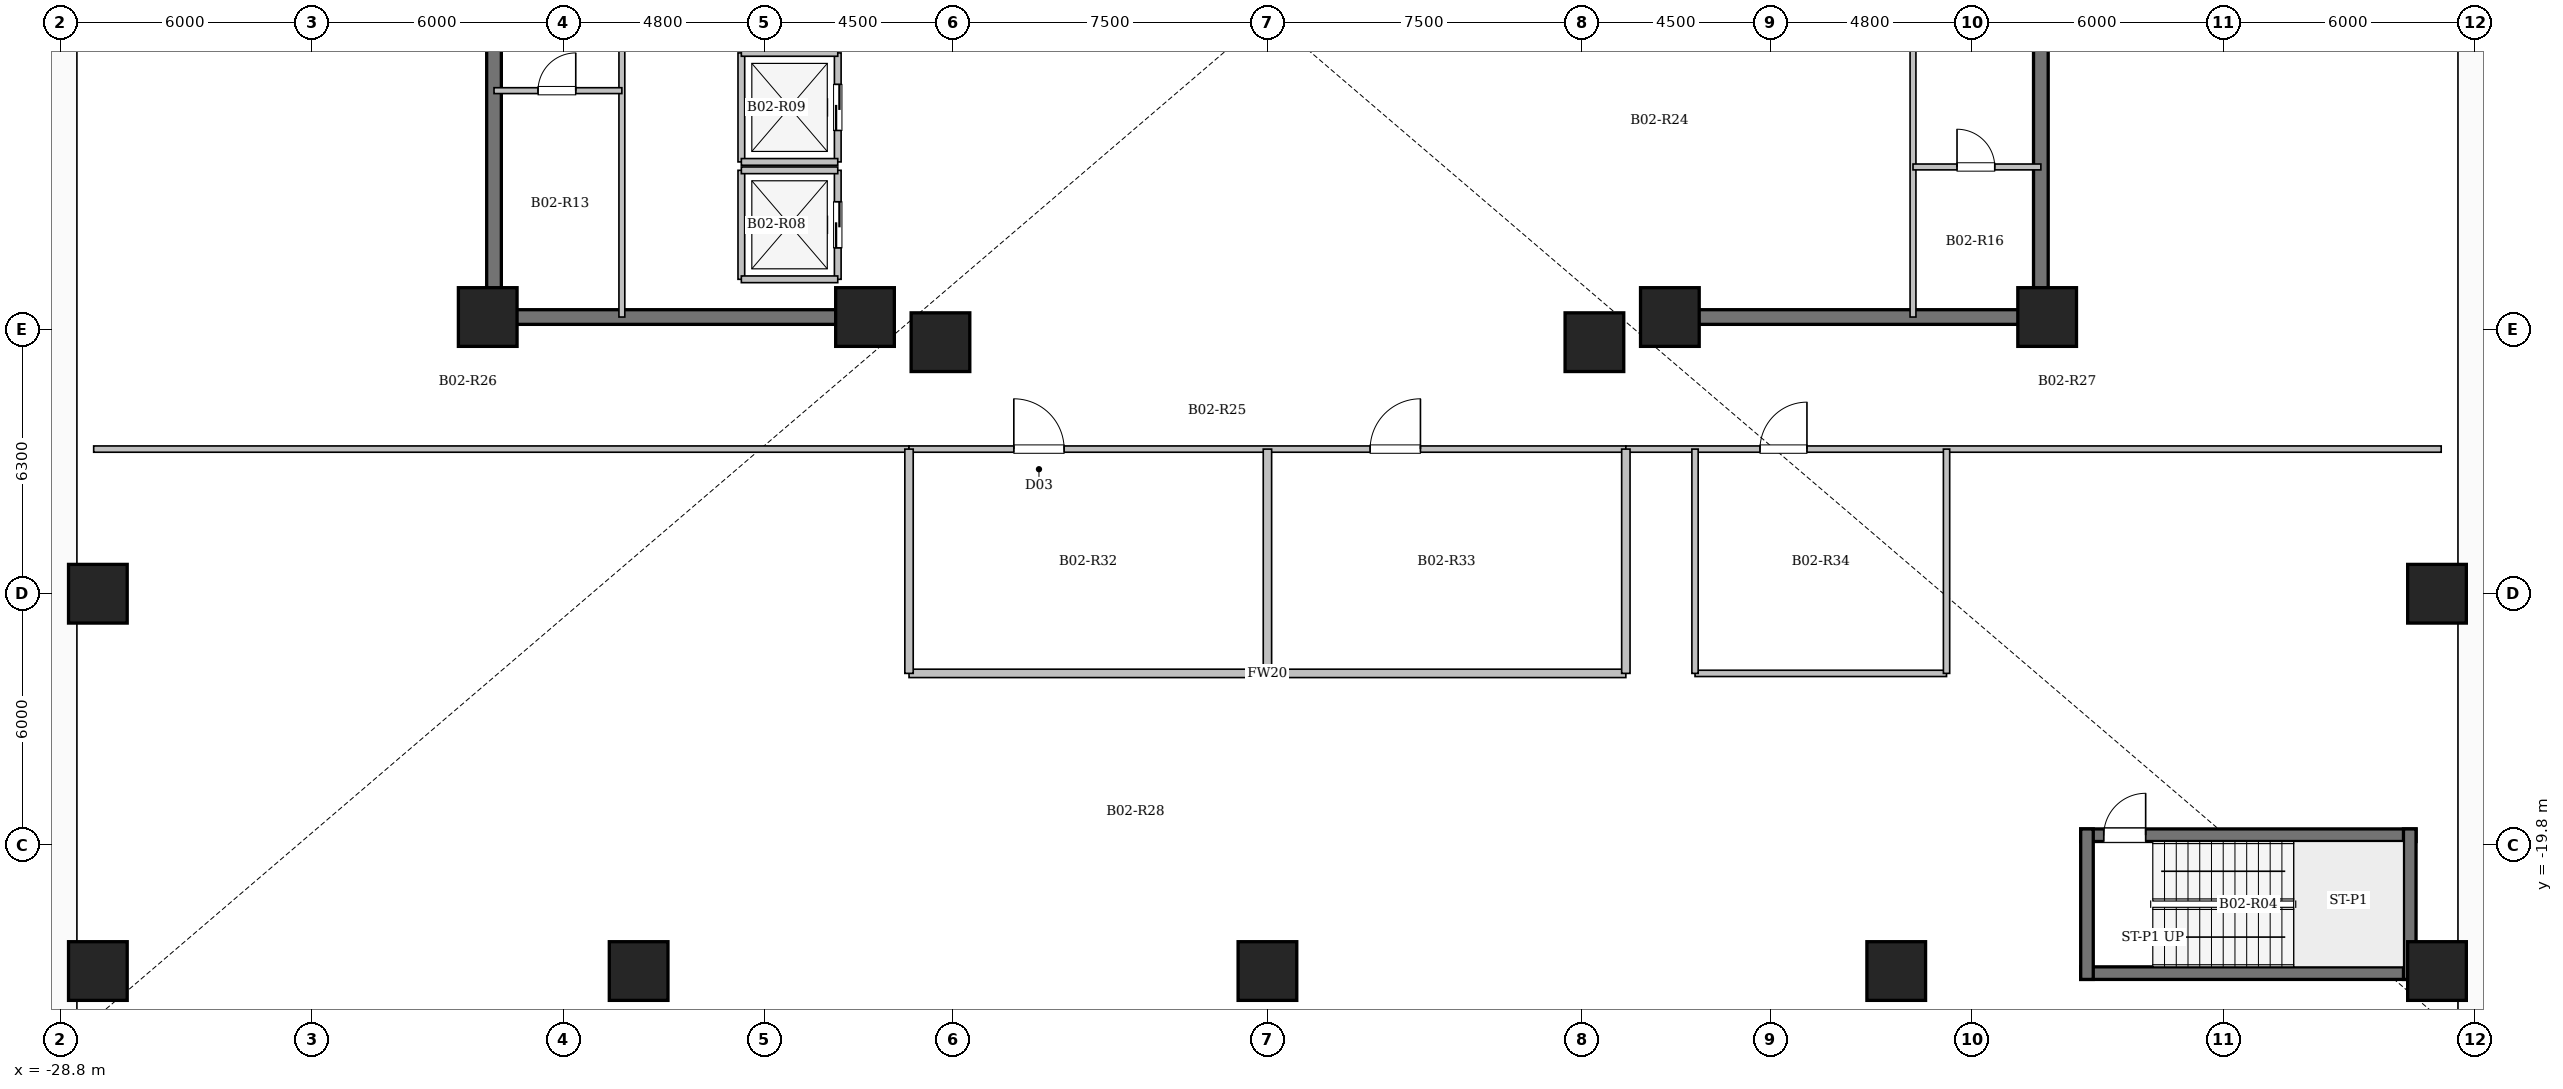
"""IFC4 building model, lengths in metres.
Left out: names, types, materials, properties, quantities, classifications, styles, units other than length and angle.
Written with IfcOpenShell. Run it as: python <this file> out.ifc"""

import sys

from ifc_helpers import new_model, si_unit, direction, frame, frame_2d, origin, origin_2d, place, context, subcontext, project, spatial, rectangle, extrude, element, fill, save


model = new_model("IFC4")
c1 = context("Model", 3, precision=1e-05, world=origin(), true_north=direction((0.0, 1.0)))
c2 = subcontext(c1, "Body", "Model", "MODEL_VIEW")
j1 = project(units=[si_unit("LENGTHUNIT", "METRE"), si_unit("PLANEANGLEUNIT", "RADIAN")], contexts=[c1])
p1 = place(None, origin())
s1 = spatial("IfcSite", under=j1, at=p1, CompositionType="ELEMENT")
p2 = place(p1, origin())
s2 = spatial("IfcBuilding", under=s1, at=p2, CompositionType="ELEMENT")
p3 = place(p2, frame((0.0, 0.0, -9.2)))
s3 = spatial("IfcBuildingStorey", under=s2, at=p3, CompositionType="ELEMENT", Elevation=-9.2)
for number, where, z_axis, x_axis in (
    (1, (-7.8, -7.8, 0.0), (0.0, 0.0, 1.0), (1.0, 0.0, 0.0)),
    (2, (7.8, -7.8, 0.0), (0.0, 0.0, 1.0), (1.0, 0.0, 0.0)),
    (3, (-9.6, -7.2, 0.0), (0.0, 0.0, 1.0), (1.0, 0.0, 0.0)),
    (4, (9.6, -7.2, 0.0), (0.0, 0.0, 1.0), (1.0, 0.0, 0.0)),
    (5, (-18.6, -7.2, 0.0), (0.0, 0.0, 1.0), (1.0, 0.0, 0.0)),
    (6, (18.6, -7.2, 0.0), (0.0, 0.0, 1.0), (1.0, 0.0, 0.0)),
    (7, (-27.9, -22.8, 0.0), (0.0, 0.0, 1.0), (1.0, 0.0, 0.0)),
    (8, (-15.0, -22.8, 0.0), (0.0, 0.0, 1.0), (1.0, 0.0, 0.0)),
    (9, (0.0, -22.8, 0.0), (0.0, 0.0, 1.0), (1.0, 0.0, 0.0)),
    (10, (15.0, -22.8, 0.0), (0.0, 0.0, 1.0), (1.0, 0.0, 0.0)),
    (11, (27.9, -22.8, 0.0), (0.0, 0.0, 1.0), (1.0, 0.0, 0.0)),
    (12, (-27.9, -13.8, 0.0), (0.0, 0.0, 1.0), (1.0, 0.0, 0.0)),
    (13, (27.9, -13.8, 0.0), (0.0, 0.0, 1.0), (1.0, 0.0, 0.0)),
):
    element("IfcColumn", number, at=place(p3, frame(where, z_axis=z_axis, x_axis=x_axis)), inside=s3, PredefinedType="COLUMN", context=c2, shape_type="SweptSolid", body=[
        extrude(rectangle(XDim=1.4, YDim=1.4, at=origin_2d()), origin(), (0.0, 0.0, 1.0), 4.6),
    ])
p4 = place(p3, frame((19.4, -19.56, 0.0), z_axis=(0.0, 0.0, 1.0), x_axis=(1.0, 0.0, 0.0)))
e14 = element("IfcWall", 14, at=p4, inside=s3, PredefinedType="SHEAR", context=c2, shape_type="SweptSolid", body=[
    extrude(rectangle(XDim=8.0, YDim=0.3, at=frame_2d((4.0, 0.0))), origin(), (0.0, 0.0, 1.0), 4.6),
])
p5 = place(p4, frame((0.55, 0.0, 0.0)))
e15 = element("IfcOpeningElement", 15, at=p5, cuts=e14, PredefinedType="OPENING", context=c2, shape_type="SweptSolid", body=[
    extrude(rectangle(XDim=1.0, YDim=2.15, at=frame_2d((0.5, 1.075))), frame((0.0, 0.16, 0.0), z_axis=(0.0, -1.0, 0.0), x_axis=(1.0, 0.0, 0.0)), (0.0, 0.0, 1.0), 0.32),
])
p6 = place(p3, frame((19.4, -22.85, 0.0), z_axis=(0.0, 0.0, 1.0), x_axis=(1.0, 0.0, 0.0)))
e16 = element("IfcWall", 16, at=p6, inside=s3, PredefinedType="SHEAR", context=c2, shape_type="SweptSolid", body=[
    extrude(rectangle(XDim=8.0, YDim=0.3, at=frame_2d((4.0, 0.0))), origin(), (0.0, 0.0, 1.0), 4.6),
])
for number, where, z_axis, x_axis in (
    (17, (19.55, -23.0, 0.0), (0.0, 0.0, 1.0), (0.0, 1.0, 0.0)),
    (18, (27.25, -23.0, 0.0), (0.0, 0.0, 1.0), (0.0, 1.0, 0.0)),
):
    element("IfcWall", number, at=place(p3, frame(where, z_axis=z_axis, x_axis=x_axis)), inside=s3, PredefinedType="SHEAR", context=c2, shape_type="SweptSolid", body=[
        extrude(rectangle(XDim=3.59, YDim=0.3, at=frame_2d((1.795, 0.0))), origin(), (0.0, 0.0, 1.0), 4.6),
    ])
p7 = place(p3, frame((-12.55, -6.3, 0.0), z_axis=(0.0, 0.0, 1.0), x_axis=(0.0, 1.0, 0.0)))
e19 = element("IfcWall", 19, at=p7, inside=s3, PredefinedType="SOLIDWALL", context=c2, shape_type="SweptSolid", body=[
    extrude(rectangle(XDim=2.6, YDim=0.16, at=frame_2d((1.3, 0.0))), origin(), (0.0, 0.0, 1.0), 4.3),
])
p8 = place(p3, frame((-10.25, -6.3, 0.0), z_axis=(0.0, 0.0, 1.0), x_axis=(0.0, 1.0, 0.0)))
e20 = element("IfcWall", 20, at=p8, inside=s3, PredefinedType="SOLIDWALL", context=c2, shape_type="SweptSolid", body=[
    extrude(rectangle(XDim=2.6, YDim=0.16, at=frame_2d((1.3, 0.0))), origin(), (0.0, 0.0, 1.0), 4.3),
])
p9 = place(p8, frame((0.75, 0.0, 0.0)))
e21 = element("IfcOpeningElement", 21, at=p9, cuts=e20, PredefinedType="OPENING", context=c2, shape_type="SweptSolid", body=[
    extrude(rectangle(XDim=1.1, YDim=2.15, at=frame_2d((0.55, 1.075))), frame((0.0, 0.09, 0.0), z_axis=(0.0, -1.0, 0.0), x_axis=(1.0, 0.0, 0.0)), (0.0, 0.0, 1.0), 0.18),
])
for number, where, z_axis, x_axis in (
    (22, (-12.55, -6.3, 0.0), (0.0, 0.0, 1.0), (1.0, 0.0, 0.0)),
    (23, (-12.55, -3.7, 0.0), (0.0, 0.0, 1.0), (1.0, 0.0, 0.0)),
):
    element("IfcWall", number, at=place(p3, frame(where, z_axis=z_axis, x_axis=x_axis)), inside=s3, PredefinedType="SOLIDWALL", context=c2, shape_type="SweptSolid", body=[
        extrude(rectangle(XDim=2.3, YDim=0.16, at=frame_2d((1.15, 0.0))), origin(), (0.0, 0.0, 1.0), 4.3),
    ])
p10 = place(p3, frame((-12.55, -3.5, 0.0), z_axis=(0.0, 0.0, 1.0), x_axis=(0.0, 1.0, 0.0)))
e24 = element("IfcWall", 24, at=p10, inside=s3, PredefinedType="SOLIDWALL", context=c2, shape_type="SweptSolid", body=[
    extrude(rectangle(XDim=2.6, YDim=0.16, at=frame_2d((1.3, 0.0))), origin(), (0.0, 0.0, 1.0), 4.3),
])
p11 = place(p3, frame((-10.25, -3.5, 0.0), z_axis=(0.0, 0.0, 1.0), x_axis=(0.0, 1.0, 0.0)))
e25 = element("IfcWall", 25, at=p11, inside=s3, PredefinedType="SOLIDWALL", context=c2, shape_type="SweptSolid", body=[
    extrude(rectangle(XDim=2.6, YDim=0.16, at=frame_2d((1.3, 0.0))), origin(), (0.0, 0.0, 1.0), 4.3),
])
p12 = place(p11, frame((0.75, 0.0, 0.0)))
e26 = element("IfcOpeningElement", 26, at=p12, cuts=e25, PredefinedType="OPENING", context=c2, shape_type="SweptSolid", body=[
    extrude(rectangle(XDim=1.1, YDim=2.15, at=frame_2d((0.55, 1.075))), frame((0.0, 0.09, 0.0), z_axis=(0.0, -1.0, 0.0), x_axis=(1.0, 0.0, 0.0)), (0.0, 0.0, 1.0), 0.18),
])
for number, where, z_axis, x_axis in (
    (27, (-12.55, -3.5, 0.0), (0.0, 0.0, 1.0), (1.0, 0.0, 0.0)),
    (28, (-12.55, -0.9, 0.0), (0.0, 0.0, 1.0), (1.0, 0.0, 0.0)),
):
    element("IfcWall", number, at=place(p3, frame(where, z_axis=z_axis, x_axis=x_axis)), inside=s3, PredefinedType="SOLIDWALL", context=c2, shape_type="SweptSolid", body=[
        extrude(rectangle(XDim=2.3, YDim=0.16, at=frame_2d((1.15, 0.0))), origin(), (0.0, 0.0, 1.0), 4.3),
    ])
p13 = place(p3, frame((-18.45, -7.375, 0.0), z_axis=(0.0, 0.0, 1.0), x_axis=(0.0, 1.0, 0.0)))
e29 = element("IfcWall", 29, at=p13, inside=s3, PredefinedType="SHEAR", context=c2, shape_type="SweptSolid", body=[
    extrude(rectangle(XDim=14.05, YDim=0.35, at=frame_2d((7.025, 0.0))), origin(), (0.0, 0.0, 1.0), 4.6),
])
p14 = place(p3, frame((-18.625, -7.2, 0.0), z_axis=(0.0, 0.0, 1.0), x_axis=(1.0, 0.0, 0.0)))
e30 = element("IfcWall", 30, at=p14, inside=s3, PredefinedType="SHEAR", context=c2, shape_type="SweptSolid", body=[
    extrude(rectangle(XDim=8.55, YDim=0.35, at=frame_2d((4.275, 0.0))), origin(), (0.0, 0.0, 1.0), 4.6),
])
p15 = place(p3, frame((18.45, -7.375, 0.0), z_axis=(0.0, 0.0, 1.0), x_axis=(0.0, 1.0, 0.0)))
e31 = element("IfcWall", 31, at=p15, inside=s3, PredefinedType="SHEAR", context=c2, shape_type="SweptSolid", body=[
    extrude(rectangle(XDim=14.05, YDim=0.35, at=frame_2d((7.025, 0.0))), origin(), (0.0, 0.0, 1.0), 4.6),
])
p16 = place(p3, frame((10.075, -7.2, 0.0), z_axis=(0.0, 0.0, 1.0), x_axis=(1.0, 0.0, 0.0)))
e32 = element("IfcWall", 32, at=p16, inside=s3, PredefinedType="SHEAR", context=c2, shape_type="SweptSolid", body=[
    extrude(rectangle(XDim=8.55, YDim=0.35, at=frame_2d((4.275, 0.0))), origin(), (0.0, 0.0, 1.0), 4.6),
])
p17 = place(p3, frame((-15.4, -7.2, 0.0), z_axis=(0.0, 0.0, 1.0), x_axis=(0.0, 1.0, 0.0)))
e33 = element("IfcWall", 33, at=p17, inside=s3, PredefinedType="PARTITIONING", context=c2, shape_type="SweptSolid", body=[
    extrude(rectangle(XDim=10.45, YDim=0.14, at=frame_2d((5.225, 0.0))), origin(), (0.0, 0.0, 1.0), 4.3),
])
p18 = place(p17, frame((9.25, 0.0, 0.0)))
e34 = element("IfcOpeningElement", 34, at=p18, cuts=e33, PredefinedType="OPENING", context=c2, shape_type="SweptSolid", body=[
    extrude(rectangle(XDim=0.9, YDim=2.08, at=frame_2d((0.45, 1.04))), frame((0.0, 0.08, 0.0), z_axis=(0.0, -1.0, 0.0), x_axis=(1.0, 0.0, 0.0)), (0.0, 0.0, 1.0), 0.16),
])
p19 = place(p3, frame((-18.45, -1.8, 0.0), z_axis=(0.0, 0.0, 1.0), x_axis=(1.0, 0.0, 0.0)))
e35 = element("IfcWall", 35, at=p19, inside=s3, PredefinedType="PARTITIONING", context=c2, shape_type="SweptSolid", body=[
    extrude(rectangle(XDim=3.05, YDim=0.14, at=frame_2d((1.525, 0.0))), origin(), (0.0, 0.0, 1.0), 4.3),
])
p20 = place(p19, frame((1.05, 0.0, 0.0)))
e36 = element("IfcOpeningElement", 36, at=p20, cuts=e35, PredefinedType="OPENING", context=c2, shape_type="SweptSolid", body=[
    extrude(rectangle(XDim=0.9, YDim=2.08, at=frame_2d((0.45, 1.04))), frame((0.0, 0.08, 0.0), z_axis=(0.0, -1.0, 0.0), x_axis=(1.0, 0.0, 0.0)), (0.0, 0.0, 1.0), 0.16),
])
p21 = place(p3, frame((15.4, -7.2, 0.0), z_axis=(0.0, 0.0, 1.0), x_axis=(0.0, 1.0, 0.0)))
e37 = element("IfcWall", 37, at=p21, inside=s3, PredefinedType="PARTITIONING", context=c2, shape_type="SweptSolid", body=[
    extrude(rectangle(XDim=10.45, YDim=0.14, at=frame_2d((5.225, 0.0))), origin(), (0.0, 0.0, 1.0), 4.3),
])
p22 = place(p21, frame((9.25, 0.0, 0.0)))
e38 = element("IfcOpeningElement", 38, at=p22, cuts=e37, PredefinedType="OPENING", context=c2, shape_type="SweptSolid", body=[
    extrude(rectangle(XDim=0.9, YDim=2.08, at=frame_2d((0.45, 1.04))), frame((0.0, 0.08, 0.0), z_axis=(0.0, -1.0, 0.0), x_axis=(1.0, 0.0, 0.0)), (0.0, 0.0, 1.0), 0.16),
])
p23 = place(p3, frame((15.4, -3.62, 0.0), z_axis=(0.0, 0.0, 1.0), x_axis=(1.0, 0.0, 0.0)))
e39 = element("IfcWall", 39, at=p23, inside=s3, PredefinedType="PARTITIONING", context=c2, shape_type="SweptSolid", body=[
    extrude(rectangle(XDim=3.05, YDim=0.14, at=frame_2d((1.525, 0.0))), origin(), (0.0, 0.0, 1.0), 4.3),
])
p24 = place(p23, frame((1.05, 0.0, 0.0)))
e40 = element("IfcOpeningElement", 40, at=p24, cuts=e39, PredefinedType="OPENING", context=c2, shape_type="SweptSolid", body=[
    extrude(rectangle(XDim=0.9, YDim=2.08, at=frame_2d((0.45, 1.04))), frame((0.0, 0.08, 0.0), z_axis=(0.0, -1.0, 0.0), x_axis=(1.0, 0.0, 0.0)), (0.0, 0.0, 1.0), 0.16),
])
p25 = place(p3, frame((-28.0, -10.35, 0.0), z_axis=(0.0, 0.0, 1.0), x_axis=(1.0, 0.0, 0.0)))
e41 = element("IfcWall", 41, at=p25, inside=s3, PredefinedType="PARTITIONING", context=c2, shape_type="SweptSolid", body=[
    extrude(rectangle(XDim=19.45, YDim=0.15, at=frame_2d((9.725, 0.0))), origin(), (0.0, 0.0, 1.0), 4.3),
])
p26 = place(p3, frame((-8.55, -10.35, 0.0), z_axis=(0.0, 0.0, 1.0), x_axis=(1.0, 0.0, 0.0)))
e42 = element("IfcWall", 42, at=p26, inside=s3, PredefinedType="PARTITIONING", context=c2, shape_type="SweptSolid", body=[
    extrude(rectangle(XDim=17.1, YDim=0.15, at=frame_2d((8.55, 0.0))), origin(), (0.0, 0.0, 1.0), 4.3),
])
p27 = place(p26, frame((2.5, 0.0, 0.0)))
e43 = element("IfcOpeningElement", 43, at=p27, cuts=e42, PredefinedType="OPENING", context=c2, shape_type="SweptSolid", body=[
    extrude(rectangle(XDim=1.2, YDim=2.2, at=frame_2d((0.6, 1.1))), frame((0.0, 0.085, 0.0), z_axis=(0.0, -1.0, 0.0), x_axis=(1.0, 0.0, 0.0)), (0.0, 0.0, 1.0), 0.17),
])
p28 = place(p26, frame((11.0, 0.0, 0.0)))
e44 = element("IfcOpeningElement", 44, at=p28, cuts=e42, PredefinedType="OPENING", context=c2, shape_type="SweptSolid", body=[
    extrude(rectangle(XDim=1.2, YDim=2.2, at=frame_2d((0.6, 1.1))), frame((0.0, 0.085, 0.0), z_axis=(0.0, -1.0, 0.0), x_axis=(1.0, 0.0, 0.0)), (0.0, 0.0, 1.0), 0.17),
])
p29 = place(p3, frame((8.55, -10.35, 0.0), z_axis=(0.0, 0.0, 1.0), x_axis=(1.0, 0.0, 0.0)))
e45 = element("IfcWall", 45, at=p29, inside=s3, PredefinedType="PARTITIONING", context=c2, shape_type="SweptSolid", body=[
    extrude(rectangle(XDim=19.45, YDim=0.15, at=frame_2d((9.725, 0.0))), origin(), (0.0, 0.0, 1.0), 4.3),
])
p30 = place(p29, frame((3.2, 0.0, 0.0)))
e46 = element("IfcOpeningElement", 46, at=p30, cuts=e45, PredefinedType="OPENING", context=c2, shape_type="SweptSolid", body=[
    extrude(rectangle(XDim=1.12, YDim=2.15, at=frame_2d((0.56, 1.075))), frame((0.0, 0.085, 0.0), z_axis=(0.0, -1.0, 0.0), x_axis=(1.0, 0.0, 0.0)), (0.0, 0.0, 1.0), 0.17),
])
p31 = place(p3, frame((-8.55, -15.7, 0.0), z_axis=(0.0, 0.0, 1.0), x_axis=(1.0, 0.0, 0.0)))
e47 = element("IfcWall", 47, at=p31, inside=s3, PredefinedType="SOLIDWALL", context=c2, shape_type="SweptSolid", body=[
    extrude(rectangle(XDim=17.1, YDim=0.2, at=frame_2d((8.55, 0.0))), origin(), (0.0, 0.0, 1.0), 4.3),
])
for number, where, z_axis, x_axis in (
    (48, (-8.55, -15.7, 0.0), (0.0, 0.0, 1.0), (0.0, 1.0, 0.0)),
    (49, (8.55, -15.7, 0.0), (0.0, 0.0, 1.0), (0.0, 1.0, 0.0)),
    (50, (0.0, -15.7, 0.0), (0.0, 0.0, 1.0), (0.0, 1.0, 0.0)),
):
    element("IfcWall", number, at=place(p3, frame(where, z_axis=z_axis, x_axis=x_axis)), inside=s3, PredefinedType="SOLIDWALL", context=c2, shape_type="SweptSolid", body=[
        extrude(rectangle(XDim=5.35, YDim=0.2, at=frame_2d((2.675, 0.0))), origin(), (0.0, 0.0, 1.0), 4.3),
    ])
p32 = place(p3, frame((10.2, -15.7, 0.0), z_axis=(0.0, 0.0, 1.0), x_axis=(1.0, 0.0, 0.0)))
e51 = element("IfcWall", 51, at=p32, inside=s3, PredefinedType="PARTITIONING", context=c2, shape_type="SweptSolid", body=[
    extrude(rectangle(XDim=6.0, YDim=0.15, at=frame_2d((3.0, 0.0))), origin(), (0.0, 0.0, 1.0), 4.3),
])
p33 = place(p3, frame((16.2, -15.7, 0.0), z_axis=(0.0, 0.0, 1.0), x_axis=(0.0, 1.0, 0.0)))
e52 = element("IfcWall", 52, at=p33, inside=s3, PredefinedType="PARTITIONING", context=c2, shape_type="SweptSolid", body=[
    extrude(rectangle(XDim=5.35, YDim=0.15, at=frame_2d((2.675, 0.0))), origin(), (0.0, 0.0, 1.0), 2.785),
])
p34 = place(p3, frame((10.2, -15.7, 0.0), z_axis=(0.0, 0.0, 1.0), x_axis=(0.0, 1.0, 0.0)))
e53 = element("IfcWall", 53, at=p34, inside=s3, PredefinedType="PARTITIONING", context=c2, shape_type="SweptSolid", body=[
    extrude(rectangle(XDim=5.35, YDim=0.15, at=frame_2d((2.675, 0.0))), origin(), (0.0, 0.0, 1.0), 4.3),
])
p35 = place(p5, origin())
e54 = element("IfcDoor", 54, at=p35, inside=s3, OperationType="SINGLE_SWING_RIGHT", PredefinedType="DOOR", context=c2, shape_type="SweptSolid", body=[
    extrude(rectangle(XDim=1.0, YDim=2.15, at=frame_2d((0.5, 1.075))), frame((0.0, 0.025, 0.0), z_axis=(0.0, -1.0, 0.0), x_axis=(1.0, 0.0, 0.0)), (0.0, 0.0, 1.0), 0.05),
])
fill(e15, e54)
p36 = place(p9, origin())
e55 = element("IfcDoor", 55, at=p36, inside=s3, OperationType="SLIDING_TO_LEFT", PredefinedType="DOOR", context=c2, shape_type="SweptSolid", body=[
    extrude(rectangle(XDim=1.1, YDim=2.15, at=frame_2d((0.55, 1.075))), frame((0.0, 0.025, 0.0), z_axis=(0.0, -1.0, 0.0), x_axis=(1.0, 0.0, 0.0)), (0.0, 0.0, 1.0), 0.05),
])
fill(e21, e55)
p37 = place(p12, origin())
e56 = element("IfcDoor", 56, at=p37, inside=s3, OperationType="SLIDING_TO_LEFT", PredefinedType="DOOR", context=c2, shape_type="SweptSolid", body=[
    extrude(rectangle(XDim=1.1, YDim=2.15, at=frame_2d((0.55, 1.075))), frame((0.0, 0.025, 0.0), z_axis=(0.0, -1.0, 0.0), x_axis=(1.0, 0.0, 0.0)), (0.0, 0.0, 1.0), 0.05),
])
fill(e26, e56)
p38 = place(p20, origin())
e57 = element("IfcDoor", 57, at=p38, inside=s3, OperationType="SINGLE_SWING_RIGHT", PredefinedType="DOOR", context=c2, shape_type="SweptSolid", body=[
    extrude(rectangle(XDim=0.9, YDim=2.08, at=frame_2d((0.45, 1.04))), frame((0.0, 0.025, 0.0), z_axis=(0.0, -1.0, 0.0), x_axis=(1.0, 0.0, 0.0)), (0.0, 0.0, 1.0), 0.05),
])
fill(e36, e57)
p39 = place(p24, origin())
e58 = element("IfcDoor", 58, at=p39, inside=s3, OperationType="SINGLE_SWING_LEFT", PredefinedType="DOOR", context=c2, shape_type="SweptSolid", body=[
    extrude(rectangle(XDim=0.9, YDim=2.08, at=frame_2d((0.45, 1.04))), frame((0.0, 0.025, 0.0), z_axis=(0.0, -1.0, 0.0), x_axis=(1.0, 0.0, 0.0)), (0.0, 0.0, 1.0), 0.05),
])
fill(e40, e58)
p40 = place(p30, origin())
e59 = element("IfcDoor", 59, at=p40, inside=s3, OperationType="SINGLE_SWING_RIGHT", PredefinedType="DOOR", context=c2, shape_type="SweptSolid", body=[
    extrude(rectangle(XDim=1.12, YDim=2.15, at=frame_2d((0.56, 1.075))), frame((0.0, 0.025, 0.0), z_axis=(0.0, -1.0, 0.0), x_axis=(1.0, 0.0, 0.0)), (0.0, 0.0, 1.0), 0.05),
])
fill(e46, e59)
p41 = place(p27, origin())
e60 = element("IfcDoor", 60, at=p41, inside=s3, OperationType="SINGLE_SWING_LEFT", PredefinedType="DOOR", context=c2, shape_type="SweptSolid", body=[
    extrude(rectangle(XDim=1.2, YDim=2.2, at=frame_2d((0.6, 1.1))), frame((0.0, 0.025, 0.0), z_axis=(0.0, -1.0, 0.0), x_axis=(1.0, 0.0, 0.0)), (0.0, 0.0, 1.0), 0.05),
])
fill(e43, e60)
p42 = place(p28, origin())
e61 = element("IfcDoor", 61, at=p42, inside=s3, OperationType="SINGLE_SWING_RIGHT", PredefinedType="DOOR", context=c2, shape_type="SweptSolid", body=[
    extrude(rectangle(XDim=1.2, YDim=2.2, at=frame_2d((0.6, 1.1))), frame((0.0, 0.025, 0.0), z_axis=(0.0, -1.0, 0.0), x_axis=(1.0, 0.0, 0.0)), (0.0, 0.0, 1.0), 0.05),
])
fill(e44, e61)
save(model, sys.argv[1])
